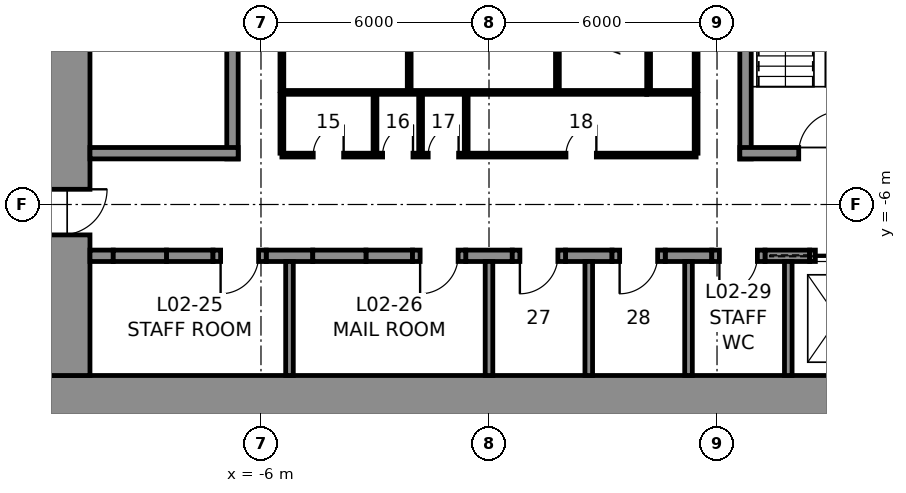
"""IFC4 building model, lengths in metres.
Left out: names, types, materials, properties, quantities, classifications, styles, units other than length and angle.
Written with IfcOpenShell. Run it as: python <this file> out.ifc"""

import sys

from ifc_helpers import new_model, si_unit, direction, frame, frame_2d, origin, place, context, subcontext, project, spatial, rectangle, extrude, element, fill, save


model = new_model("IFC4")
c1 = context("Model", 3, precision=1e-05, world=origin(), true_north=direction((0.0, 1.0)))
c2 = subcontext(c1, "Body", "Model", "MODEL_VIEW")
j1 = project(units=[si_unit("LENGTHUNIT", "METRE"), si_unit("PLANEANGLEUNIT", "RADIAN")], contexts=[c1])
p1 = place(None, origin())
s1 = spatial("IfcSite", under=j1, at=p1, CompositionType="ELEMENT")
p2 = place(p1, origin())
s2 = spatial("IfcBuilding", under=s1, at=p2, CompositionType="ELEMENT")
p3 = place(p2, frame((0.0, 0.0, 11.0)))
s3 = spatial("IfcBuildingStorey", under=s2, at=p3, CompositionType="ELEMENT", Elevation=11.0)
p4 = place(p3, frame((12.0, -11.25, 0.0), z_axis=(0.0, 0.0, 1.0), x_axis=(-1.0, 0.0, 0.0)))
e1 = element("IfcWall", 1, at=p4, inside=s3, PredefinedType="SHEAR", context=c2, shape_type="SweptSolid", body=[
    extrude(rectangle(XDim=24.0, YDim=1.5, at=frame_2d((12.0, 0.0))), origin(), (0.0, 0.0, 1.0), 5.0),
])
p5 = place(p3, frame((-11.25, -10.5, 0.0), z_axis=(0.0, 0.0, 1.0), x_axis=(0.0, 1.0, 0.0)))
e2 = element("IfcWall", 2, at=p5, inside=s3, PredefinedType="SHEAR", context=c2, shape_type="SweptSolid", body=[
    extrude(rectangle(XDim=21.0, YDim=1.5, at=frame_2d((10.5, 0.0))), origin(), (0.0, 0.0, 1.0), 5.0),
])
p6 = place(p5, frame((16.1, 0.0, 0.0)))
e3 = element("IfcOpeningElement", 3, at=p6, cuts=e2, PredefinedType="OPENING", context=c2, shape_type="SweptSolid", body=[
    extrude(rectangle(XDim=1.2, YDim=2.3, at=frame_2d((0.6, 1.15))), frame((0.0, 0.76, 0.0), z_axis=(0.0, -1.0, 0.0), x_axis=(1.0, 0.0, 0.0)), (0.0, 0.0, 1.0), 1.52),
])
p7 = place(p5, frame((3.7, 0.0, 0.0)))
e4 = element("IfcOpeningElement", 4, at=p7, cuts=e2, PredefinedType="OPENING", context=c2, shape_type="SweptSolid", body=[
    extrude(rectangle(XDim=1.2, YDim=2.3, at=frame_2d((0.6, 1.15))), frame((0.0, 0.76, 0.0), z_axis=(0.0, -1.0, 0.0), x_axis=(1.0, 0.0, 0.0)), (0.0, 0.0, 1.0), 1.52),
])
p8 = place(p3, frame((-10.5, -7.35, 0.0), z_axis=(0.0, 0.0, 1.0), x_axis=(1.0, 0.0, 0.0)))
e5 = element("IfcWall", 5, at=p8, inside=s3, PredefinedType="SHEAR", context=c2, shape_type="SweptSolid", body=[
    extrude(rectangle(XDim=0.613, YDim=0.3, at=frame_2d((0.306, 0.0))), origin(), (0.0, 0.0, 1.0), 5.0),
])
for number, where, z_axis, x_axis in (
    (6, (-8.488, -7.35, 0.0), (0.0, 0.0, 1.0), (1.0, 0.0, 0.0)),
    (7, (-5.863, -7.35, 0.0), (0.0, 0.0, 1.0), (1.0, 0.0, 0.0)),
    (8, (-3.238, -7.35, 0.0), (0.0, 0.0, 1.0), (1.0, 0.0, 0.0)),
    (9, (-0.613, -7.35, 0.0), (0.0, 0.0, 1.0), (1.0, 0.0, 0.0)),
    (10, (2.012, -7.35, 0.0), (0.0, 0.0, 1.0), (1.0, 0.0, 0.0)),
    (11, (4.637, -7.35, 0.0), (0.0, 0.0, 1.0), (1.0, 0.0, 0.0)),
):
    element("IfcWall", number, at=place(p3, frame(where, z_axis=z_axis, x_axis=x_axis)), inside=s3, PredefinedType="SHEAR", context=c2, shape_type="SweptSolid", body=[
        extrude(rectangle(XDim=1.225, YDim=0.3, at=frame_2d((0.613, 0.0))), origin(), (0.0, 0.0, 1.0), 5.0),
    ])
p9 = place(p3, frame((7.262, -7.35, 0.0), z_axis=(0.0, 0.0, 1.0), x_axis=(1.0, 0.0, 0.0)))
e12 = element("IfcWall", 12, at=p9, inside=s3, PredefinedType="SHEAR", context=c2, shape_type="SweptSolid", body=[
    extrude(rectangle(XDim=1.175, YDim=0.3, at=frame_2d((0.587, 0.0))), origin(), (0.0, 0.0, 1.0), 5.0),
])
p10 = place(p3, frame((-9.887, -7.35, 0.0), z_axis=(0.0, 0.0, 1.0), x_axis=(1.0, 0.0, 0.0)))
e13 = element("IfcWall", 13, at=p10, inside=s3, PredefinedType="PARTITIONING", context=c2, shape_type="SweptSolid", body=[
    extrude(rectangle(XDim=1.4, YDim=0.3, at=frame_2d((0.7, 0.0))), origin(), (0.0, 0.0, 1.0), 5.0),
])
p11 = place(p3, frame((-7.262, -7.35, 0.0), z_axis=(0.0, 0.0, 1.0), x_axis=(1.0, 0.0, 0.0)))
e14 = element("IfcWall", 14, at=p11, inside=s3, PredefinedType="PARTITIONING", context=c2, shape_type="SweptSolid", body=[
    extrude(rectangle(XDim=1.4, YDim=0.3, at=frame_2d((0.7, 0.0))), origin(), (0.0, 0.0, 1.0), 5.0),
])
p12 = place(p11, frame((0.2, 0.0, 0.0)))
e15 = element("IfcOpeningElement", 15, at=p12, cuts=e14, PredefinedType="OPENING", context=c2, shape_type="SweptSolid", body=[
    extrude(rectangle(XDim=1.0, YDim=2.3, at=frame_2d((0.5, 1.15))), frame((0.0, 0.16, 0.0), z_axis=(0.0, -1.0, 0.0), x_axis=(1.0, 0.0, 0.0)), (0.0, 0.0, 1.0), 0.32),
])
p13 = place(p3, frame((-4.637, -7.35, 0.0), z_axis=(0.0, 0.0, 1.0), x_axis=(1.0, 0.0, 0.0)))
e16 = element("IfcWall", 16, at=p13, inside=s3, PredefinedType="PARTITIONING", context=c2, shape_type="SweptSolid", body=[
    extrude(rectangle(XDim=1.4, YDim=0.3, at=frame_2d((0.7, 0.0))), origin(), (0.0, 0.0, 1.0), 5.0),
])
p14 = place(p3, frame((-2.012, -7.35, 0.0), z_axis=(0.0, 0.0, 1.0), x_axis=(1.0, 0.0, 0.0)))
e17 = element("IfcWall", 17, at=p14, inside=s3, PredefinedType="PARTITIONING", context=c2, shape_type="SweptSolid", body=[
    extrude(rectangle(XDim=1.4, YDim=0.3, at=frame_2d((0.7, 0.0))), origin(), (0.0, 0.0, 1.0), 5.0),
])
p15 = place(p14, frame((0.2, 0.0, 0.0)))
e18 = element("IfcOpeningElement", 18, at=p15, cuts=e17, PredefinedType="OPENING", context=c2, shape_type="SweptSolid", body=[
    extrude(rectangle(XDim=1.0, YDim=2.3, at=frame_2d((0.5, 1.15))), frame((0.0, 0.16, 0.0), z_axis=(0.0, -1.0, 0.0), x_axis=(1.0, 0.0, 0.0)), (0.0, 0.0, 1.0), 0.32),
])
p16 = place(p3, frame((0.613, -7.35, 0.0), z_axis=(0.0, 0.0, 1.0), x_axis=(1.0, 0.0, 0.0)))
e19 = element("IfcWall", 19, at=p16, inside=s3, PredefinedType="PARTITIONING", context=c2, shape_type="SweptSolid", body=[
    extrude(rectangle(XDim=1.4, YDim=0.3, at=frame_2d((0.7, 0.0))), origin(), (0.0, 0.0, 1.0), 5.0),
])
p17 = place(p16, frame((0.2, 0.0, 0.0)))
e20 = element("IfcOpeningElement", 20, at=p17, cuts=e19, PredefinedType="OPENING", context=c2, shape_type="SweptSolid", body=[
    extrude(rectangle(XDim=1.0, YDim=2.3, at=frame_2d((0.5, 1.15))), frame((0.0, 0.16, 0.0), z_axis=(0.0, -1.0, 0.0), x_axis=(1.0, 0.0, 0.0)), (0.0, 0.0, 1.0), 0.32),
])
p18 = place(p3, frame((3.238, -7.35, 0.0), z_axis=(0.0, 0.0, 1.0), x_axis=(1.0, 0.0, 0.0)))
e21 = element("IfcWall", 21, at=p18, inside=s3, PredefinedType="PARTITIONING", context=c2, shape_type="SweptSolid", body=[
    extrude(rectangle(XDim=1.4, YDim=0.3, at=frame_2d((0.7, 0.0))), origin(), (0.0, 0.0, 1.0), 5.0),
])
p19 = place(p18, frame((0.2, 0.0, 0.0)))
e22 = element("IfcOpeningElement", 22, at=p19, cuts=e21, PredefinedType="OPENING", context=c2, shape_type="SweptSolid", body=[
    extrude(rectangle(XDim=1.0, YDim=2.3, at=frame_2d((0.5, 1.15))), frame((0.0, 0.16, 0.0), z_axis=(0.0, -1.0, 0.0), x_axis=(1.0, 0.0, 0.0)), (0.0, 0.0, 1.0), 0.32),
])
p20 = place(p3, frame((5.863, -7.35, 0.0), z_axis=(0.0, 0.0, 1.0), x_axis=(1.0, 0.0, 0.0)))
e23 = element("IfcWall", 23, at=p20, inside=s3, PredefinedType="PARTITIONING", context=c2, shape_type="SweptSolid", body=[
    extrude(rectangle(XDim=1.4, YDim=0.3, at=frame_2d((0.7, 0.0))), origin(), (0.0, 0.0, 1.0), 5.0),
])
p21 = place(p20, frame((0.2, 0.0, 0.0)))
e24 = element("IfcOpeningElement", 24, at=p21, cuts=e23, PredefinedType="OPENING", context=c2, shape_type="SweptSolid", body=[
    extrude(rectangle(XDim=1.0, YDim=2.3, at=frame_2d((0.5, 1.15))), frame((0.0, 0.16, 0.0), z_axis=(0.0, -1.0, 0.0), x_axis=(1.0, 0.0, 0.0)), (0.0, 0.0, 1.0), 0.32),
])
p22 = place(p3, frame((8.438, -7.35, 0.0), z_axis=(0.0, 0.0, 1.0), x_axis=(1.0, 0.0, 0.0)))
e25 = element("IfcWall", 25, at=p22, inside=s3, PredefinedType="PARTITIONING", context=c2, shape_type="SweptSolid", body=[
    extrude(rectangle(XDim=1.5, YDim=0.3, at=frame_2d((0.75, 0.0))), origin(), (0.0, 0.0, 1.0), 5.0),
])
p23 = place(p22, frame((0.15, 0.0, 0.0)))
e26 = element("IfcOpeningElement", 26, at=p23, cuts=e25, PredefinedType="OPENING", context=c2, shape_type="SweptSolid", body=[
    extrude(rectangle(XDim=1.2, YDim=2.3, at=frame_2d((0.6, 1.15))), frame((0.0, 0.16, 0.0), z_axis=(0.0, -1.0, 0.0), x_axis=(1.0, 0.0, 0.0)), (0.0, 0.0, 1.0), 0.32),
])
for number, where, z_axis, x_axis in (
    (27, (-5.25, -10.5, 0.0), (0.0, 0.0, 1.0), (0.0, 1.0, 0.0)),
    (28, (0.0, -10.5, 0.0), (0.0, 0.0, 1.0), (0.0, 1.0, 0.0)),
    (29, (2.625, -10.5, 0.0), (0.0, 0.0, 1.0), (0.0, 1.0, 0.0)),
    (30, (5.25, -10.5, 0.0), (0.0, 0.0, 1.0), (0.0, 1.0, 0.0)),
    (31, (7.875, -10.5, 0.0), (0.0, 0.0, 1.0), (0.0, 1.0, 0.0)),
):
    element("IfcWall", number, at=place(p3, frame(where, z_axis=z_axis, x_axis=x_axis)), inside=s3, PredefinedType="PARTITIONING", context=c2, shape_type="SweptSolid", body=[
        extrude(rectangle(XDim=3.0, YDim=0.2, at=frame_2d((1.5, 0.0))), origin(), (0.0, 0.0, 1.0), 5.0),
    ])
p24 = place(p3, frame((-6.75, -4.8, 0.0), z_axis=(0.0, 0.0, 1.0), x_axis=(0.0, 1.0, 0.0)))
e32 = element("IfcWall", 32, at=p24, inside=s3, PredefinedType="SOLIDWALL", context=c2, shape_type="SweptSolid", body=[
    extrude(rectangle(XDim=9.6, YDim=0.3, at=frame_2d((4.8, 0.0))), origin(), (0.0, 0.0, 1.0), 4.75),
])
p25 = place(p3, frame((-6.6, -4.65, 0.0), z_axis=(0.0, 0.0, 1.0), x_axis=(-1.0, 0.0, 0.0)))
e33 = element("IfcWall", 33, at=p25, inside=s3, PredefinedType="SOLIDWALL", context=c2, shape_type="SweptSolid", body=[
    extrude(rectangle(XDim=3.9, YDim=0.3, at=frame_2d((1.95, 0.0))), origin(), (0.0, 0.0, 1.0), 4.75),
])
p26 = place(p3, frame((6.75, -4.8, 0.0), z_axis=(0.0, 0.0, 1.0), x_axis=(0.0, 1.0, 0.0)))
e34 = element("IfcWall", 34, at=p26, inside=s3, PredefinedType="SOLIDWALL", context=c2, shape_type="SweptSolid", body=[
    extrude(rectangle(XDim=9.6, YDim=0.3, at=frame_2d((4.8, 0.0))), origin(), (0.0, 0.0, 1.0), 4.75),
])
p27 = place(p3, frame((10.5, -4.65, 0.0), z_axis=(0.0, 0.0, 1.0), x_axis=(-1.0, 0.0, 0.0)))
e35 = element("IfcWall", 35, at=p27, inside=s3, PredefinedType="SOLIDWALL", context=c2, shape_type="SweptSolid", body=[
    extrude(rectangle(XDim=3.9, YDim=0.3, at=frame_2d((1.95, 0.0))), origin(), (0.0, 0.0, 1.0), 4.75),
])
p28 = place(p27, frame((1.25, 0.0, 0.0)))
e36 = element("IfcOpeningElement", 36, at=p28, cuts=e35, PredefinedType="OPENING", context=c2, shape_type="SweptSolid", body=[
    extrude(rectangle(XDim=1.1, YDim=2.3, at=frame_2d((0.55, 1.15))), frame((0.0, 0.16, 0.0), z_axis=(0.0, -1.0, 0.0), x_axis=(1.0, 0.0, 0.0)), (0.0, 0.0, 1.0), 0.32),
])
p29 = place(p3, frame((4.15, -3.05, 0.0), z_axis=(0.0, 0.0, 1.0), x_axis=(-1.0, 0.0, 0.0)))
e37 = element("IfcWall", 37, at=p29, inside=s3, PredefinedType="PARTITIONING", context=c2, shape_type="SweptSolid", body=[
    extrude(rectangle(XDim=9.6, YDim=0.1, at=frame_2d((4.8, 0.0))), origin(), (0.0, 0.0, 1.0), 4.75),
])
p30 = place(p3, frame((5.45, -3.05, 0.0), z_axis=(0.0, 0.0, 1.0), x_axis=(-1.0, 0.0, 0.0)))
e38 = element("IfcWall", 38, at=p30, inside=s3, PredefinedType="PARTITIONING", context=c2, shape_type="SweptSolid", body=[
    extrude(rectangle(XDim=1.3, YDim=0.1, at=frame_2d((0.65, 0.0))), origin(), (0.0, 0.0, 1.0), 4.75),
])
for number, where, z_axis, x_axis in (
    (39, (5.45, 3.0, 0.0), (0.0, 0.0, 1.0), (0.0, -1.0, 0.0)),
    (40, (-5.45, -3.0, 0.0), (0.0, 0.0, 1.0), (0.0, 1.0, 0.0)),
    (41, (-2.1, -3.0, 0.0), (0.0, 0.0, 1.0), (0.0, 1.0, 0.0)),
    (42, (1.8, -3.0, 0.0), (0.0, 0.0, 1.0), (0.0, 1.0, 0.0)),
    (43, (4.2, -3.0, 0.0), (0.0, 0.0, 1.0), (0.0, 1.0, 0.0)),
):
    element("IfcWall", number, at=place(p3, frame(where, z_axis=z_axis, x_axis=x_axis)), inside=s3, PredefinedType="PARTITIONING", context=c2, shape_type="SweptSolid", body=[
        extrude(rectangle(XDim=6.0, YDim=0.1, at=frame_2d((3.0, 0.0))), origin(), (0.0, 0.0, 1.0), 4.75),
    ])
p31 = place(p3, frame((5.45, -4.7, 0.0), z_axis=(0.0, 0.0, 1.0), x_axis=(-1.0, 0.0, 0.0)))
e44 = element("IfcWall", 44, at=p31, inside=s3, PredefinedType="PARTITIONING", context=c2, shape_type="SweptSolid", body=[
    extrude(rectangle(XDim=10.9, YDim=0.1, at=frame_2d((5.45, 0.0))), origin(), (0.0, 0.0, 1.0), 4.75),
])
p32 = place(p31, frame((9.275, 0.0, 0.0)))
e45 = element("IfcOpeningElement", 45, at=p32, cuts=e44, PredefinedType="OPENING", context=c2, shape_type="SweptSolid", body=[
    extrude(rectangle(XDim=0.8, YDim=2.3, at=frame_2d((0.4, 1.15))), frame((0.0, 0.06, 0.0), z_axis=(0.0, -1.0, 0.0), x_axis=(1.0, 0.0, 0.0)), (0.0, 0.0, 1.0), 0.12),
])
p33 = place(p31, frame((7.45, 0.0, 0.0)))
e46 = element("IfcOpeningElement", 46, at=p33, cuts=e44, PredefinedType="OPENING", context=c2, shape_type="SweptSolid", body=[
    extrude(rectangle(XDim=0.8, YDim=2.3, at=frame_2d((0.4, 1.15))), frame((0.0, 0.06, 0.0), z_axis=(0.0, -1.0, 0.0), x_axis=(1.0, 0.0, 0.0)), (0.0, 0.0, 1.0), 0.12),
])
p34 = place(p31, frame((6.25, 0.0, 0.0)))
e47 = element("IfcOpeningElement", 47, at=p34, cuts=e44, PredefinedType="OPENING", context=c2, shape_type="SweptSolid", body=[
    extrude(rectangle(XDim=0.8, YDim=2.3, at=frame_2d((0.4, 1.15))), frame((0.0, 0.06, 0.0), z_axis=(0.0, -1.0, 0.0), x_axis=(1.0, 0.0, 0.0)), (0.0, 0.0, 1.0), 0.12),
])
p35 = place(p31, frame((2.625, 0.0, 0.0)))
e48 = element("IfcOpeningElement", 48, at=p35, cuts=e44, PredefinedType="OPENING", context=c2, shape_type="SweptSolid", body=[
    extrude(rectangle(XDim=0.8, YDim=2.3, at=frame_2d((0.4, 1.15))), frame((0.0, 0.06, 0.0), z_axis=(0.0, -1.0, 0.0), x_axis=(1.0, 0.0, 0.0)), (0.0, 0.0, 1.0), 0.12),
])
for number, where, z_axis, x_axis in (
    (49, (-5.45, -3.1, 0.0), (0.0, 0.0, 1.0), (0.0, -1.0, 0.0)),
    (50, (5.45, -3.1, 0.0), (0.0, 0.0, 1.0), (0.0, -1.0, 0.0)),
    (51, (-3.0, -3.1, 0.0), (0.0, 0.0, 1.0), (0.0, -1.0, 0.0)),
    (52, (-1.8, -3.1, 0.0), (0.0, 0.0, 1.0), (0.0, -1.0, 0.0)),
    (53, (-0.6, -3.1, 0.0), (0.0, 0.0, 1.0), (0.0, -1.0, 0.0)),
):
    element("IfcWall", number, at=place(p3, frame(where, z_axis=z_axis, x_axis=x_axis)), inside=s3, PredefinedType="PARTITIONING", context=c2, shape_type="SweptSolid", body=[
        extrude(rectangle(XDim=1.55, YDim=0.1, at=frame_2d((0.775, 0.0))), origin(), (0.0, 0.0, 1.0), 4.75),
    ])
p36 = place(p28, frame((1.1, 0.0, 0.0), z_axis=(0.0, 0.0, 1.0), x_axis=(-1.0, 0.0, 0.0)))
e54 = element("IfcDoor", 54, at=p36, inside=s3, OperationType="SINGLE_SWING_RIGHT", PredefinedType="DOOR", context=c2, shape_type="SweptSolid", body=[
    extrude(rectangle(XDim=1.1, YDim=2.3, at=frame_2d((0.55, 1.15))), frame((0.0, 0.025, 0.0), z_axis=(0.0, -1.0, 0.0), x_axis=(1.0, 0.0, 0.0)), (0.0, 0.0, 1.0), 0.05),
])
fill(e36, e54)
p37 = place(p32, frame((0.8, 0.0, 0.0), z_axis=(0.0, 0.0, 1.0), x_axis=(-1.0, 0.0, 0.0)))
e55 = element("IfcDoor", 55, at=p37, inside=s3, OperationType="SINGLE_SWING_RIGHT", PredefinedType="DOOR", context=c2, shape_type="SweptSolid", body=[
    extrude(rectangle(XDim=0.8, YDim=2.3, at=frame_2d((0.4, 1.15))), frame((0.0, 0.025, 0.0), z_axis=(0.0, -1.0, 0.0), x_axis=(1.0, 0.0, 0.0)), (0.0, 0.0, 1.0), 0.05),
])
fill(e45, e55)
p38 = place(p33, frame((0.8, 0.0, 0.0), z_axis=(0.0, 0.0, 1.0), x_axis=(-1.0, 0.0, 0.0)))
e56 = element("IfcDoor", 56, at=p38, inside=s3, OperationType="SINGLE_SWING_RIGHT", PredefinedType="DOOR", context=c2, shape_type="SweptSolid", body=[
    extrude(rectangle(XDim=0.8, YDim=2.3, at=frame_2d((0.4, 1.15))), frame((0.0, 0.025, 0.0), z_axis=(0.0, -1.0, 0.0), x_axis=(1.0, 0.0, 0.0)), (0.0, 0.0, 1.0), 0.05),
])
fill(e46, e56)
p39 = place(p34, frame((0.8, 0.0, 0.0), z_axis=(0.0, 0.0, 1.0), x_axis=(-1.0, 0.0, 0.0)))
e57 = element("IfcDoor", 57, at=p39, inside=s3, OperationType="SINGLE_SWING_RIGHT", PredefinedType="DOOR", context=c2, shape_type="SweptSolid", body=[
    extrude(rectangle(XDim=0.8, YDim=2.3, at=frame_2d((0.4, 1.15))), frame((0.0, 0.025, 0.0), z_axis=(0.0, -1.0, 0.0), x_axis=(1.0, 0.0, 0.0)), (0.0, 0.0, 1.0), 0.05),
])
fill(e47, e57)
p40 = place(p35, frame((0.8, 0.0, 0.0), z_axis=(0.0, 0.0, 1.0), x_axis=(-1.0, 0.0, 0.0)))
e58 = element("IfcDoor", 58, at=p40, inside=s3, OperationType="SINGLE_SWING_RIGHT", PredefinedType="DOOR", context=c2, shape_type="SweptSolid", body=[
    extrude(rectangle(XDim=0.8, YDim=2.3, at=frame_2d((0.4, 1.15))), frame((0.0, 0.025, 0.0), z_axis=(0.0, -1.0, 0.0), x_axis=(1.0, 0.0, 0.0)), (0.0, 0.0, 1.0), 0.05),
])
fill(e48, e58)
p41 = place(p12, frame((1.0, 0.0, 0.0), z_axis=(0.0, 0.0, 1.0), x_axis=(-1.0, 0.0, 0.0)))
e59 = element("IfcDoor", 59, at=p41, inside=s3, OperationType="SINGLE_SWING_RIGHT", PredefinedType="DOOR", context=c2, shape_type="SweptSolid", body=[
    extrude(rectangle(XDim=1.0, YDim=2.3, at=frame_2d((0.5, 1.15))), frame((0.0, 0.025, 0.0), z_axis=(0.0, -1.0, 0.0), x_axis=(1.0, 0.0, 0.0)), (0.0, 0.0, 1.0), 0.05),
])
fill(e15, e59)
p42 = place(p15, frame((1.0, 0.0, 0.0), z_axis=(0.0, 0.0, 1.0), x_axis=(-1.0, 0.0, 0.0)))
e60 = element("IfcDoor", 60, at=p42, inside=s3, OperationType="SINGLE_SWING_RIGHT", PredefinedType="DOOR", context=c2, shape_type="SweptSolid", body=[
    extrude(rectangle(XDim=1.0, YDim=2.3, at=frame_2d((0.5, 1.15))), frame((0.0, 0.025, 0.0), z_axis=(0.0, -1.0, 0.0), x_axis=(1.0, 0.0, 0.0)), (0.0, 0.0, 1.0), 0.05),
])
fill(e18, e60)
p43 = place(p17, frame((1.0, 0.0, 0.0), z_axis=(0.0, 0.0, 1.0), x_axis=(-1.0, 0.0, 0.0)))
e61 = element("IfcDoor", 61, at=p43, inside=s3, OperationType="SINGLE_SWING_RIGHT", PredefinedType="DOOR", context=c2, shape_type="SweptSolid", body=[
    extrude(rectangle(XDim=1.0, YDim=2.3, at=frame_2d((0.5, 1.15))), frame((0.0, 0.025, 0.0), z_axis=(0.0, -1.0, 0.0), x_axis=(1.0, 0.0, 0.0)), (0.0, 0.0, 1.0), 0.05),
])
fill(e20, e61)
p44 = place(p19, frame((1.0, 0.0, 0.0), z_axis=(0.0, 0.0, 1.0), x_axis=(-1.0, 0.0, 0.0)))
e62 = element("IfcDoor", 62, at=p44, inside=s3, OperationType="SINGLE_SWING_RIGHT", PredefinedType="DOOR", context=c2, shape_type="SweptSolid", body=[
    extrude(rectangle(XDim=1.0, YDim=2.3, at=frame_2d((0.5, 1.15))), frame((0.0, 0.025, 0.0), z_axis=(0.0, -1.0, 0.0), x_axis=(1.0, 0.0, 0.0)), (0.0, 0.0, 1.0), 0.05),
])
fill(e22, e62)
p45 = place(p21, frame((1.0, 0.0, 0.0), z_axis=(0.0, 0.0, 1.0), x_axis=(-1.0, 0.0, 0.0)))
e63 = element("IfcDoor", 63, at=p45, inside=s3, OperationType="SINGLE_SWING_RIGHT", PredefinedType="DOOR", context=c2, shape_type="SweptSolid", body=[
    extrude(rectangle(XDim=1.0, YDim=2.3, at=frame_2d((0.5, 1.15))), frame((0.0, 0.025, 0.0), z_axis=(0.0, -1.0, 0.0), x_axis=(1.0, 0.0, 0.0)), (0.0, 0.0, 1.0), 0.05),
])
fill(e24, e63)
p46 = place(p7, frame((1.2, 0.0, 0.0), z_axis=(0.0, 0.0, 1.0), x_axis=(-1.0, 0.0, 0.0)))
e64 = element("IfcDoor", 64, at=p46, inside=s3, OperationType="SINGLE_SWING_LEFT", PredefinedType="DOOR", context=c2, shape_type="SweptSolid", body=[
    extrude(rectangle(XDim=1.2, YDim=2.3, at=frame_2d((0.6, 1.15))), frame((0.0, 0.025, 0.0), z_axis=(0.0, -1.0, 0.0), x_axis=(1.0, 0.0, 0.0)), (0.0, 0.0, 1.0), 0.05),
])
fill(e4, e64)
p47 = place(p23, origin())
e65 = element("IfcDoor", 65, at=p47, inside=s3, OperationType="SLIDING_TO_LEFT", PredefinedType="DOOR", context=c2, shape_type="SweptSolid", body=[
    extrude(rectangle(XDim=1.2, YDim=2.3, at=frame_2d((0.6, 1.15))), frame((0.0, 0.025, 0.0), z_axis=(0.0, -1.0, 0.0), x_axis=(1.0, 0.0, 0.0)), (0.0, 0.0, 1.0), 0.05),
])
fill(e26, e65)
save(model, sys.argv[1])
